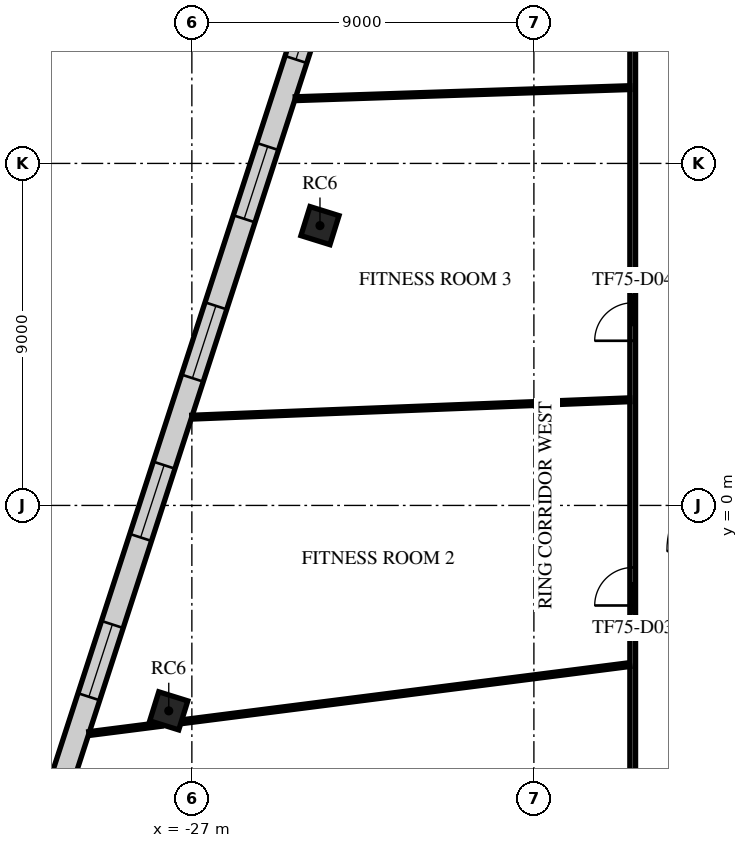
"""IFC4 building model, lengths in metres.
Left out: names, types, materials, properties, quantities, classifications, styles, units other than length and angle.
Written with IfcOpenShell. Run it as: python <this file> out.ifc"""

import sys

from ifc_helpers import new_model, si_unit, direction, frame, frame_2d, origin, origin_2d, place, context, subcontext, project, spatial, rectangle, extrude, element, fill, save


model = new_model("IFC4")
c1 = context("Model", 3, precision=1e-05, world=origin(), true_north=direction((0.0, 1.0)))
c2 = subcontext(c1, "Body", "Model", "MODEL_VIEW")
j1 = project(units=[si_unit("LENGTHUNIT", "METRE"), si_unit("PLANEANGLEUNIT", "RADIAN")], contexts=[c1])
p1 = place(None, origin())
s1 = spatial("IfcSite", under=j1, at=p1, CompositionType="ELEMENT")
p2 = place(p1, origin())
s2 = spatial("IfcBuilding", under=s1, at=p2, CompositionType="ELEMENT")
p3 = place(p2, frame((0.0, 0.0, 316.5)))
s3 = spatial("IfcBuildingStorey", under=s2, at=p3, CompositionType="ELEMENT", Elevation=316.5)
for number, where, z_axis, x_axis in (
    (1, (-23.629, 7.363, 0.0), (0.0, 0.0, 1.0), (0.298, 0.955, 0.0)),
    (2, (-27.608, -5.406, 0.0), (0.0, 0.0, 1.0), (0.298, 0.955, 0.0)),
):
    element("IfcColumn", number, at=place(p3, frame(where, z_axis=z_axis, x_axis=x_axis)), inside=s3, PredefinedType="COLUMN", context=c2, shape_type="SweptSolid", body=[
        extrude(rectangle(XDim=0.8, YDim=0.8, at=origin_2d()), origin(), (0.0, 0.0, 1.0), 4.0),
    ])
p4 = place(p3, frame((-17.822, 31.552, 0.0), z_axis=(0.0, 0.0, 1.0), x_axis=(-0.309018218247, -0.951056118634, 0.0)))
e3 = element("IfcWall", 3, at=p4, inside=s3, PredefinedType="STANDARD", context=c2, shape_type="SweptSolid", body=[
    extrude(rectangle(XDim=48.49, YDim=0.6, at=frame_2d((24.245, 0.0))), origin(), (0.0, 0.0, 1.0), 3.65),
])
p5 = place(p4, frame((1.204, 0.0, 0.9)))
e4 = element("IfcOpeningElement", 4, at=p5, cuts=e3, PredefinedType="OPENING", context=c2, shape_type="SweptSolid", body=[
    extrude(rectangle(XDim=2.0, YDim=2.1, at=frame_2d((1.0, 1.05))), frame((0.0, 0.31, 0.0), z_axis=(0.0, -1.0, 0.0), x_axis=(1.0, 0.0, 0.0)), (0.0, 0.0, 1.0), 0.62),
])
p6 = place(p4, frame((5.612, 0.0, 0.9)))
e5 = element("IfcOpeningElement", 5, at=p6, cuts=e3, PredefinedType="OPENING", context=c2, shape_type="SweptSolid", body=[
    extrude(rectangle(XDim=2.0, YDim=2.1, at=frame_2d((1.0, 1.05))), frame((0.0, 0.31, 0.0), z_axis=(0.0, -1.0, 0.0), x_axis=(1.0, 0.0, 0.0)), (0.0, 0.0, 1.0), 0.62),
])
p7 = place(p4, frame((10.021, 0.0, 0.9)))
e6 = element("IfcOpeningElement", 6, at=p7, cuts=e3, PredefinedType="OPENING", context=c2, shape_type="SweptSolid", body=[
    extrude(rectangle(XDim=2.0, YDim=2.1, at=frame_2d((1.0, 1.05))), frame((0.0, 0.31, 0.0), z_axis=(0.0, -1.0, 0.0), x_axis=(1.0, 0.0, 0.0)), (0.0, 0.0, 1.0), 0.62),
])
p8 = place(p4, frame((14.428, 0.0, 0.9)))
e7 = element("IfcOpeningElement", 7, at=p8, cuts=e3, PredefinedType="OPENING", context=c2, shape_type="SweptSolid", body=[
    extrude(rectangle(XDim=2.0, YDim=2.1, at=frame_2d((1.0, 1.05))), frame((0.0, 0.31, 0.0), z_axis=(0.0, -1.0, 0.0), x_axis=(1.0, 0.0, 0.0)), (0.0, 0.0, 1.0), 0.62),
])
p9 = place(p4, frame((18.837, 0.0, 0.9)))
e8 = element("IfcOpeningElement", 8, at=p9, cuts=e3, PredefinedType="OPENING", context=c2, shape_type="SweptSolid", body=[
    extrude(rectangle(XDim=2.0, YDim=2.1, at=frame_2d((1.0, 1.05))), frame((0.0, 0.31, 0.0), z_axis=(0.0, -1.0, 0.0), x_axis=(1.0, 0.0, 0.0)), (0.0, 0.0, 1.0), 0.62),
])
p10 = place(p4, frame((23.245, 0.0, 0.9)))
e9 = element("IfcOpeningElement", 9, at=p10, cuts=e3, PredefinedType="OPENING", context=c2, shape_type="SweptSolid", body=[
    extrude(rectangle(XDim=2.0, YDim=2.1, at=frame_2d((1.0, 1.05))), frame((0.0, 0.31, 0.0), z_axis=(0.0, -1.0, 0.0), x_axis=(1.0, 0.0, 0.0)), (0.0, 0.0, 1.0), 0.62),
])
p11 = place(p4, frame((27.653, 0.0, 0.9)))
e10 = element("IfcOpeningElement", 10, at=p11, cuts=e3, PredefinedType="OPENING", context=c2, shape_type="SweptSolid", body=[
    extrude(rectangle(XDim=2.0, YDim=2.1, at=frame_2d((1.0, 1.05))), frame((0.0, 0.31, 0.0), z_axis=(0.0, -1.0, 0.0), x_axis=(1.0, 0.0, 0.0)), (0.0, 0.0, 1.0), 0.62),
])
p12 = place(p4, frame((32.061, 0.0, 0.9)))
e11 = element("IfcOpeningElement", 11, at=p12, cuts=e3, PredefinedType="OPENING", context=c2, shape_type="SweptSolid", body=[
    extrude(rectangle(XDim=2.0, YDim=2.1, at=frame_2d((1.0, 1.05))), frame((0.0, 0.31, 0.0), z_axis=(0.0, -1.0, 0.0), x_axis=(1.0, 0.0, 0.0)), (0.0, 0.0, 1.0), 0.62),
])
p13 = place(p4, frame((36.469, 0.0, 0.9)))
e12 = element("IfcOpeningElement", 12, at=p13, cuts=e3, PredefinedType="OPENING", context=c2, shape_type="SweptSolid", body=[
    extrude(rectangle(XDim=2.0, YDim=2.1, at=frame_2d((1.0, 1.05))), frame((0.0, 0.31, 0.0), z_axis=(0.0, -1.0, 0.0), x_axis=(1.0, 0.0, 0.0)), (0.0, 0.0, 1.0), 0.62),
])
p14 = place(p4, frame((40.877, 0.0, 0.9)))
e13 = element("IfcOpeningElement", 13, at=p14, cuts=e3, PredefinedType="OPENING", context=c2, shape_type="SweptSolid", body=[
    extrude(rectangle(XDim=2.0, YDim=2.1, at=frame_2d((1.0, 1.05))), frame((0.0, 0.31, 0.0), z_axis=(0.0, -1.0, 0.0), x_axis=(1.0, 0.0, 0.0)), (0.0, 0.0, 1.0), 0.62),
])
p15 = place(p4, frame((45.285, 0.0, 0.9)))
e14 = element("IfcOpeningElement", 14, at=p15, cuts=e3, PredefinedType="OPENING", context=c2, shape_type="SweptSolid", body=[
    extrude(rectangle(XDim=2.0, YDim=2.1, at=frame_2d((1.0, 1.05))), frame((0.0, 0.31, 0.0), z_axis=(0.0, -1.0, 0.0), x_axis=(1.0, 0.0, 0.0)), (0.0, 0.0, 1.0), 0.62),
])
p16 = place(p3, frame((-15.4, -12.4, 0.0), z_axis=(0.0, 0.0, 1.0), x_axis=(0.0, 1.0, 0.0)))
e15 = element("IfcWall", 15, at=p16, inside=s3, PredefinedType="PARTITIONING", context=c2, shape_type="SweptSolid", body=[
    extrude(rectangle(XDim=24.8, YDim=0.15, at=frame_2d((12.4, 0.0))), origin(), (0.0, 0.0, 1.0), 3.25),
])
p17 = place(p16, frame((1.05, 0.0, 0.0)))
e16 = element("IfcOpeningElement", 16, at=p17, cuts=e15, PredefinedType="OPENING", context=c2, shape_type="SweptSolid", body=[
    extrude(rectangle(XDim=1.0, YDim=2.1, at=frame_2d((0.5, 1.05))), frame((0.0, 0.085, 0.0), z_axis=(0.0, -1.0, 0.0), x_axis=(1.0, 0.0, 0.0)), (0.0, 0.0, 1.0), 0.17),
])
p18 = place(p16, frame((9.767, 0.0, 0.0)))
e17 = element("IfcOpeningElement", 17, at=p18, cuts=e15, PredefinedType="OPENING", context=c2, shape_type="SweptSolid", body=[
    extrude(rectangle(XDim=1.0, YDim=2.1, at=frame_2d((0.5, 1.05))), frame((0.0, 0.085, 0.0), z_axis=(0.0, -1.0, 0.0), x_axis=(1.0, 0.0, 0.0)), (0.0, 0.0, 1.0), 0.17),
])
p19 = place(p16, frame((16.733, 0.0, 0.0)))
e18 = element("IfcOpeningElement", 18, at=p19, cuts=e15, PredefinedType="OPENING", context=c2, shape_type="SweptSolid", body=[
    extrude(rectangle(XDim=1.0, YDim=2.1, at=frame_2d((0.5, 1.05))), frame((0.0, 0.085, 0.0), z_axis=(0.0, -1.0, 0.0), x_axis=(1.0, 0.0, 0.0)), (0.0, 0.0, 1.0), 0.17),
])
p20 = place(p3, frame((-29.707, -6.004, 0.0), z_axis=(0.0, 0.0, 1.0), x_axis=(0.991958310613, 0.126565042593, 0.0)))
e19 = element("IfcWall", 19, at=p20, inside=s3, PredefinedType="PARTITIONING", context=c2, shape_type="SweptSolid", body=[
    extrude(rectangle(XDim=1.912, YDim=0.1, at=frame_2d((0.956, 0.0))), origin(), (0.0, 0.0, 1.0), 3.65),
])
p21 = place(p3, frame((-27.279, -5.694, 0.0), z_axis=(0.0, 0.0, 1.0), x_axis=(0.991957239154, 0.126573439907, 0.0)))
e20 = element("IfcWall", 20, at=p21, inside=s3, PredefinedType="PARTITIONING", context=c2, shape_type="SweptSolid", body=[
    extrude(rectangle(XDim=11.893, YDim=0.1, at=frame_2d((5.947, 0.0))), origin(), (0.0, 0.0, 1.0), 3.13),
])
p22 = place(p3, frame((-27.002, 2.323, 0.0), z_axis=(0.0, 0.0, 1.0), x_axis=(0.999209591443, 0.039751633537, 0.0)))
e21 = element("IfcWall", 21, at=p22, inside=s3, PredefinedType="PARTITIONING", context=c2, shape_type="SweptSolid", body=[
    extrude(rectangle(XDim=11.534, YDim=0.1, at=frame_2d((5.767, 0.0))), origin(), (0.0, 0.0, 1.0), 3.05),
])
p23 = place(p3, frame((-24.279, 10.703, 0.0), z_axis=(0.0, 0.0, 1.0), x_axis=(0.999452969423, 0.033072071465, 0.0)))
e22 = element("IfcWall", 22, at=p23, inside=s3, PredefinedType="PARTITIONING", context=c2, shape_type="SweptSolid", body=[
    extrude(rectangle(XDim=8.807, YDim=0.1, at=frame_2d((4.403, 0.0))), origin(), (0.0, 0.0, 1.0), 3.05),
])
p24 = place(p9, origin())
e23 = element("IfcWindow", 23, at=p24, inside=s3, PartitioningType="SINGLE_PANEL", PredefinedType="WINDOW", context=c2, shape_type="SweptSolid", body=[
    extrude(rectangle(XDim=2.0, YDim=2.1, at=frame_2d((1.0, 1.05))), frame((0.0, 0.03, 0.0), z_axis=(0.0, -1.0, 0.0), x_axis=(1.0, 0.0, 0.0)), (0.0, 0.0, 1.0), 0.06),
])
fill(e8, e23)
p25 = place(p10, origin())
e24 = element("IfcWindow", 24, at=p25, inside=s3, PartitioningType="SINGLE_PANEL", PredefinedType="WINDOW", context=c2, shape_type="SweptSolid", body=[
    extrude(rectangle(XDim=2.0, YDim=2.1, at=frame_2d((1.0, 1.05))), frame((0.0, 0.03, 0.0), z_axis=(0.0, -1.0, 0.0), x_axis=(1.0, 0.0, 0.0)), (0.0, 0.0, 1.0), 0.06),
])
fill(e9, e24)
p26 = place(p11, origin())
e25 = element("IfcWindow", 25, at=p26, inside=s3, PartitioningType="SINGLE_PANEL", PredefinedType="WINDOW", context=c2, shape_type="SweptSolid", body=[
    extrude(rectangle(XDim=2.0, YDim=2.1, at=frame_2d((1.0, 1.05))), frame((0.0, 0.03, 0.0), z_axis=(0.0, -1.0, 0.0), x_axis=(1.0, 0.0, 0.0)), (0.0, 0.0, 1.0), 0.06),
])
fill(e10, e25)
p27 = place(p12, origin())
e26 = element("IfcWindow", 26, at=p27, inside=s3, PartitioningType="SINGLE_PANEL", PredefinedType="WINDOW", context=c2, shape_type="SweptSolid", body=[
    extrude(rectangle(XDim=2.0, YDim=2.1, at=frame_2d((1.0, 1.05))), frame((0.0, 0.03, 0.0), z_axis=(0.0, -1.0, 0.0), x_axis=(1.0, 0.0, 0.0)), (0.0, 0.0, 1.0), 0.06),
])
fill(e11, e26)
p28 = place(p13, origin())
e27 = element("IfcWindow", 27, at=p28, inside=s3, PartitioningType="SINGLE_PANEL", PredefinedType="WINDOW", context=c2, shape_type="SweptSolid", body=[
    extrude(rectangle(XDim=2.0, YDim=2.1, at=frame_2d((1.0, 1.05))), frame((0.0, 0.03, 0.0), z_axis=(0.0, -1.0, 0.0), x_axis=(1.0, 0.0, 0.0)), (0.0, 0.0, 1.0), 0.06),
])
fill(e12, e27)
p29 = place(p18, origin())
e28 = element("IfcDoor", 28, at=p29, inside=s3, OperationType="SINGLE_SWING_LEFT", PredefinedType="DOOR", context=c2, shape_type="SweptSolid", body=[
    extrude(rectangle(XDim=1.0, YDim=2.1, at=frame_2d((0.5, 1.05))), frame((0.0, 0.025, 0.0), z_axis=(0.0, -1.0, 0.0), x_axis=(1.0, 0.0, 0.0)), (0.0, 0.0, 1.0), 0.05),
])
fill(e17, e28)
p30 = place(p19, origin())
e29 = element("IfcDoor", 29, at=p30, inside=s3, OperationType="SINGLE_SWING_LEFT", PredefinedType="DOOR", context=c2, shape_type="SweptSolid", body=[
    extrude(rectangle(XDim=1.0, YDim=2.1, at=frame_2d((0.5, 1.05))), frame((0.0, 0.025, 0.0), z_axis=(0.0, -1.0, 0.0), x_axis=(1.0, 0.0, 0.0)), (0.0, 0.0, 1.0), 0.05),
])
fill(e18, e29)
save(model, sys.argv[1])
